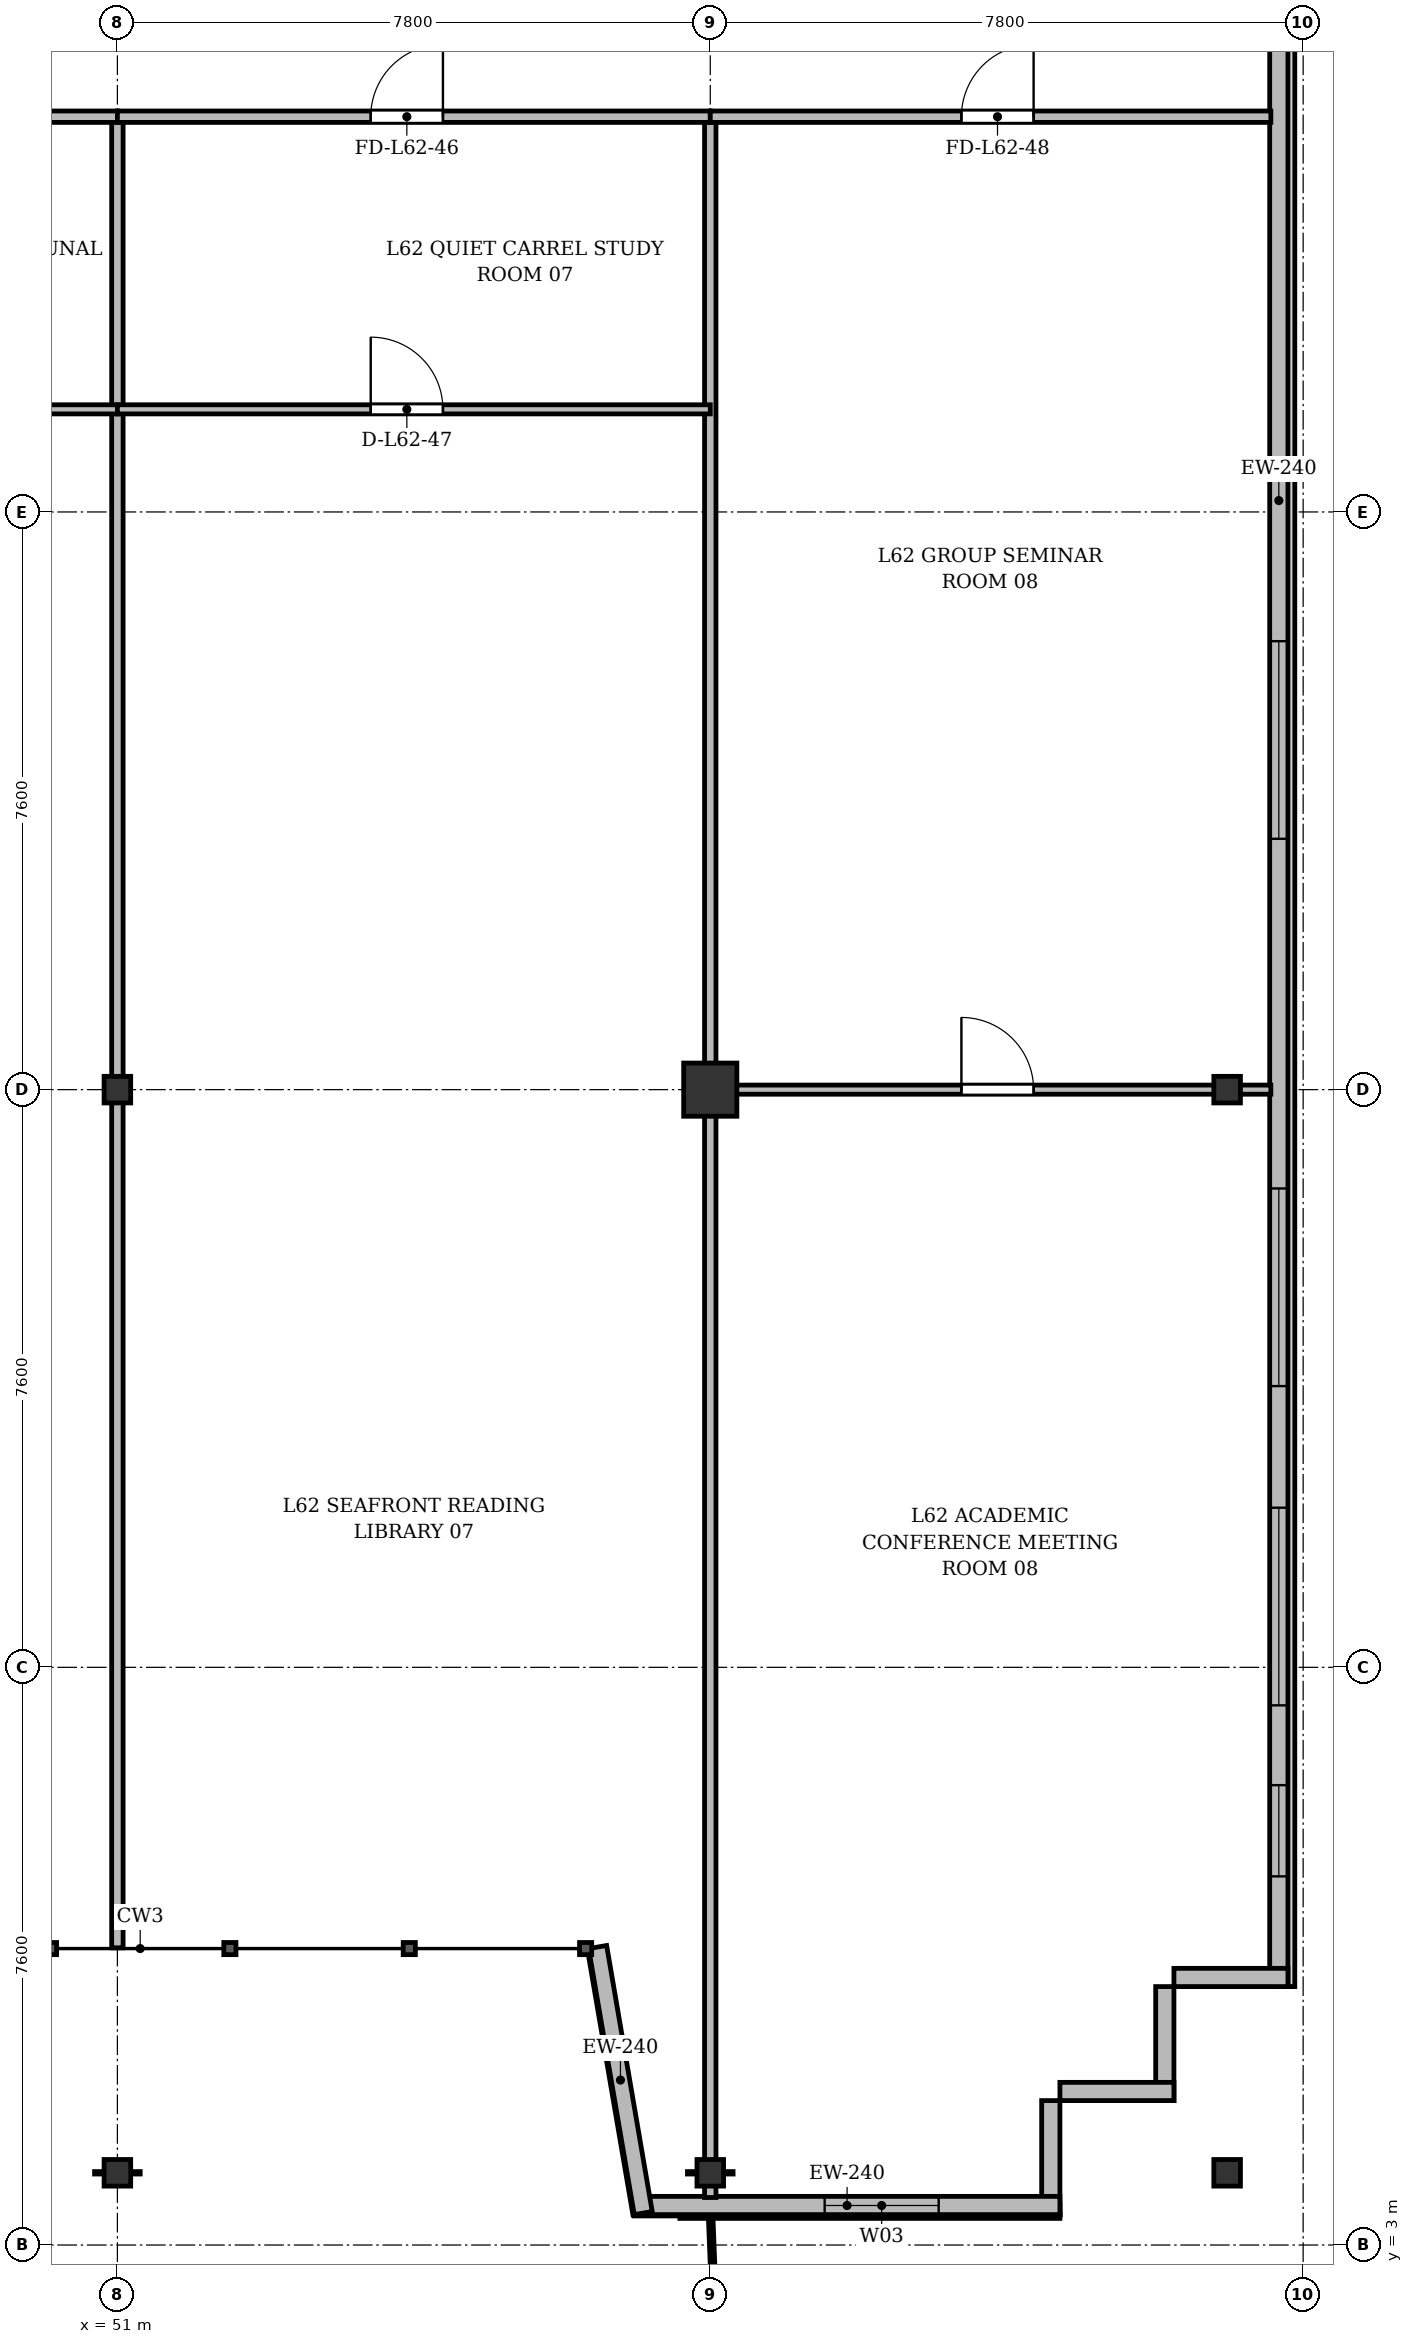
"""IFC4 building model, lengths in metres.
Left out: names, types, materials, properties, quantities, classifications, styles, units other than length and angle.
Written with IfcOpenShell. Run it as: python <this file> out.ifc"""

import sys

from ifc_helpers import new_model, si_unit, direction, frame, frame_2d, origin, origin_2d, place, context, subcontext, project, spatial, rectangle, i_section, extrude, source, transform, mapped, element, fill, save


model = new_model("IFC4")
c1 = context("Model", 3, precision=1e-05, world=origin(), true_north=direction((0.0, 1.0)))
c2 = subcontext(c1, "Body", "Model", "MODEL_VIEW")
j1 = project(units=[si_unit("LENGTHUNIT", "METRE"), si_unit("PLANEANGLEUNIT", "RADIAN")], contexts=[c1])
p1 = place(None, origin())
s1 = spatial("IfcSite", under=j1, at=p1, CompositionType="ELEMENT")
p2 = place(p1, origin())
s2 = spatial("IfcBuilding", under=s1, at=p2, CompositionType="ELEMENT")
p3 = place(p2, frame((0.0, 0.0, 237.3)))
s3 = spatial("IfcBuildingStorey", under=s2, at=p3, CompositionType="ELEMENT", Elevation=237.3)
m1 = source(origin(), c2, "Body", "SweptSolid", [
    extrude(i_section(OverallWidth=0.35, OverallDepth=0.35, WebThickness=0.018, FlangeThickness=0.028, at=origin_2d()), origin(), (0.0, 0.0, 1.0), 3.6),
])
for number, where, z_axis, x_axis in (
    (1, (51.0, 3.95, 0.0), (0.0, 0.0, 1.0), (1.0, 0.0, 0.0)),
    (2, (51.0, 18.2, 0.0), (0.0, 0.0, 1.0), (1.0, 0.0, 0.0)),
    (3, (58.8, 3.95, 0.0), (0.0, 0.0, 1.0), (1.0, 0.0, 0.0)),
):
    element("IfcColumn", number, at=place(p3, frame(where, z_axis=z_axis, x_axis=x_axis)), inside=s3, PredefinedType="COLUMN", context=c2, shape_type="MappedRepresentation", body=[
        mapped(m1, transform((0.0, 0.0, 0.0), x_axis=(1.0, 0.0, 0.0), y_axis=(0.0, 1.0, 0.0), z_axis=(0.0, 0.0, 1.0), scale=1.0)),
    ])
m2 = source(origin(), c2, "Body", "SweptSolid", [
    extrude(rectangle(XDim=0.7, YDim=0.7, at=origin_2d()), origin(), (0.0, 0.0, 1.0), 3.6),
])
p4 = place(p3, frame((58.8, 18.2, 0.0), z_axis=(0.0, 0.0, 1.0), x_axis=(1.0, 0.0, 0.0)))
e4 = element("IfcColumn", 4, at=p4, inside=s3, PredefinedType="COLUMN", context=c2, shape_type="MappedRepresentation", body=[
    mapped(m2, transform((0.0, 0.0, 0.0), x_axis=(1.0, 0.0, 0.0), y_axis=(0.0, 1.0, 0.0), z_axis=(0.0, 0.0, 1.0), scale=1.0)),
])
for number, where, z_axis, x_axis in (
    (5, (65.6, 3.95, 0.0), (0.0, 0.0, 1.0), (1.0, 0.0, 0.0)),
    (6, (65.6, 18.2, 0.0), (0.0, 0.0, 1.0), (1.0, 0.0, 0.0)),
):
    element("IfcColumn", number, at=place(p3, frame(where, z_axis=z_axis, x_axis=x_axis)), inside=s3, PredefinedType="COLUMN", context=c2, shape_type="MappedRepresentation", body=[
        mapped(m1, transform((0.0, 0.0, 0.0), x_axis=(1.0, 0.0, 0.0), y_axis=(0.0, 1.0, 0.0), z_axis=(0.0, 0.0, 1.0), scale=1.0)),
    ])
p5 = place(p3, frame((66.28, 45.5, 0.0), z_axis=(0.0, 0.0, 1.0), x_axis=(0.0, -1.0, 0.0)))
e7 = element("IfcWall", 7, at=p5, inside=s3, PredefinedType="SOLIDWALL", context=c2, shape_type="SweptSolid", body=[
    extrude(rectangle(XDim=39.1, YDim=0.24, at=frame_2d((19.55, 0.0))), origin(), (0.0, 0.0, 1.0), 3.22),
])
p6 = place(p5, frame((36.45, 0.0, 0.92)))
e8 = element("IfcOpeningElement", 8, at=p6, cuts=e7, PredefinedType="OPENING", context=c2, shape_type="SweptSolid", body=[
    extrude(rectangle(XDim=1.2, YDim=1.65, at=frame_2d((0.6, 0.825))), frame((0.0, 0.13, 0.0), z_axis=(0.0, -1.0, 0.0), x_axis=(1.0, 0.0, 0.0)), (0.0, 0.0, 1.0), 0.26),
])
p7 = place(p5, frame((32.8, 0.0, 0.92)))
e9 = element("IfcOpeningElement", 9, at=p7, cuts=e7, PredefinedType="OPENING", context=c2, shape_type="SweptSolid", body=[
    extrude(rectangle(XDim=2.6, YDim=1.9, at=frame_2d((1.3, 0.95))), frame((0.0, 0.13, 0.0), z_axis=(0.0, -1.0, 0.0), x_axis=(1.0, 0.0, 0.0)), (0.0, 0.0, 1.0), 0.26),
])
p8 = place(p5, frame((28.6, 0.0, 0.92)))
e10 = element("IfcOpeningElement", 10, at=p8, cuts=e7, PredefinedType="OPENING", context=c2, shape_type="SweptSolid", body=[
    extrude(rectangle(XDim=2.6, YDim=1.9, at=frame_2d((1.3, 0.95))), frame((0.0, 0.13, 0.0), z_axis=(0.0, -1.0, 0.0), x_axis=(1.0, 0.0, 0.0)), (0.0, 0.0, 1.0), 0.26),
])
p9 = place(p5, frame((21.4, 0.0, 0.92)))
e11 = element("IfcOpeningElement", 11, at=p9, cuts=e7, PredefinedType="OPENING", context=c2, shape_type="SweptSolid", body=[
    extrude(rectangle(XDim=2.6, YDim=1.9, at=frame_2d((1.3, 0.95))), frame((0.0, 0.13, 0.0), z_axis=(0.0, -1.0, 0.0), x_axis=(1.0, 0.0, 0.0)), (0.0, 0.0, 1.0), 0.26),
])
p10 = place(p5, frame((7.4, 0.0, 0.92)))
e12 = element("IfcOpeningElement", 12, at=p10, cuts=e7, PredefinedType="OPENING", context=c2, shape_type="SweptSolid", body=[
    extrude(rectangle(XDim=2.6, YDim=1.9, at=frame_2d((1.3, 0.95))), frame((0.0, 0.13, 0.0), z_axis=(0.0, -1.0, 0.0), x_axis=(1.0, 0.0, 0.0)), (0.0, 0.0, 1.0), 0.26),
])
p11 = place(p5, frame((4.5, 0.0, 0.92)))
e13 = element("IfcOpeningElement", 13, at=p11, cuts=e7, PredefinedType="OPENING", context=c2, shape_type="SweptSolid", body=[
    extrude(rectangle(XDim=1.2, YDim=1.65, at=frame_2d((0.6, 0.825))), frame((0.0, 0.13, 0.0), z_axis=(0.0, -1.0, 0.0), x_axis=(1.0, 0.0, 0.0)), (0.0, 0.0, 1.0), 0.26),
])
p12 = place(p5, frame((1.15, 0.0, 0.92)))
e14 = element("IfcOpeningElement", 14, at=p12, cuts=e7, PredefinedType="OPENING", context=c2, shape_type="SweptSolid", body=[
    extrude(rectangle(XDim=1.2, YDim=1.65, at=frame_2d((0.6, 0.825))), frame((0.0, 0.13, 0.0), z_axis=(0.0, -1.0, 0.0), x_axis=(1.0, 0.0, 0.0)), (0.0, 0.0, 1.0), 0.26),
])
p13 = place(p3, frame((66.4, 6.52, 0.0), z_axis=(0.0, 0.0, 1.0), x_axis=(-1.0, 0.0, 0.0)))
e15 = element("IfcWall", 15, at=p13, inside=s3, PredefinedType="SOLIDWALL", context=c2, shape_type="SweptSolid", body=[
    extrude(rectangle(XDim=1.5, YDim=0.24, at=frame_2d((0.75, 0.0))), origin(), (0.0, 0.0, 1.0), 2.72),
])
for number, where, z_axis, x_axis in (
    (16, (64.78, 6.4, 0.0), (0.0, 0.0, 1.0), (0.0, -1.0, 0.0)),
    (17, (64.9, 5.02, 0.0), (0.0, 0.0, 1.0), (-1.0, 0.0, 0.0)),
):
    element("IfcWall", number, at=place(p3, frame(where, z_axis=z_axis, x_axis=x_axis)), inside=s3, PredefinedType="SOLIDWALL", context=c2, shape_type="SweptSolid", body=[
        extrude(rectangle(XDim=1.5, YDim=0.24, at=frame_2d((0.75, 0.0))), origin(), (0.0, 0.0, 1.0), 3.22),
    ])
p14 = place(p3, frame((63.28, 4.9, 0.0), z_axis=(0.0, 0.0, 1.0), x_axis=(0.0, -1.0, 0.0)))
e18 = element("IfcWall", 18, at=p14, inside=s3, PredefinedType="SOLIDWALL", context=c2, shape_type="SweptSolid", body=[
    extrude(rectangle(XDim=1.5, YDim=0.24, at=frame_2d((0.75, 0.0))), origin(), (0.0, 0.0, 1.0), 2.77),
])
p15 = place(p3, frame((63.4, 3.52, 0.0), z_axis=(0.0, 0.0, 1.0), x_axis=(-1.0, 0.0, 0.0)))
e19 = element("IfcWall", 19, at=p15, inside=s3, PredefinedType="SOLIDWALL", context=c2, shape_type="SweptSolid", body=[
    extrude(rectangle(XDim=5.6, YDim=0.24, at=frame_2d((2.8, 0.0))), origin(), (0.0, 0.0, 1.0), 3.22),
])
p16 = place(p15, frame((1.595, 0.0, 0.9)))
e20 = element("IfcOpeningElement", 20, at=p16, cuts=e19, PredefinedType="OPENING", context=c2, shape_type="SweptSolid", body=[
    extrude(rectangle(XDim=1.5, YDim=1.75, at=frame_2d((0.75, 0.875))), frame((0.0, 0.13, 0.0), z_axis=(0.0, -1.0, 0.0), x_axis=(1.0, 0.0, 0.0)), (0.0, 0.0, 1.0), 0.26),
])
p17 = place(p3, frame((57.918, 3.42, 0.0), z_axis=(0.0, 0.0, 1.0), x_axis=(-0.168923741424, 0.98562912375, 0.0)))
e21 = element("IfcWall", 21, at=p17, inside=s3, PredefinedType="SOLIDWALL", context=c2, shape_type="SweptSolid", body=[
    extrude(rectangle(XDim=3.551, YDim=0.24, at=frame_2d((1.775, 0.0))), origin(), (0.0, 0.0, 1.0), 2.77),
])
p18 = place(p3, frame((51.0, 6.91, 0.0), z_axis=(0.0, 0.0, 1.0), x_axis=(0.0, 1.0, 0.0)))
e22 = element("IfcWall", 22, at=p18, inside=s3, PredefinedType="PARTITIONING", context=c2, shape_type="SweptSolid", body=[
    extrude(rectangle(XDim=24.09, YDim=0.15, at=frame_2d((12.045, 0.0))), origin(), (0.0, 0.0, 1.0), 2.72),
])
p19 = place(p3, frame((58.8, 3.625, 0.0), z_axis=(0.0, 0.0, 1.0), x_axis=(0.0, 1.0, 0.0)))
e23 = element("IfcWall", 23, at=p19, inside=s3, PredefinedType="PARTITIONING", context=c2, shape_type="SweptSolid", body=[
    extrude(rectangle(XDim=27.375, YDim=0.15, at=frame_2d((13.688, 0.0))), origin(), (0.0, 0.0, 1.0), 2.72),
])
p20 = place(p3, frame((43.8, 31.0, 0.0), z_axis=(0.0, 0.0, 1.0), x_axis=(1.0, 0.0, 0.0)))
e24 = element("IfcWall", 24, at=p20, inside=s3, PredefinedType="PARTITIONING", context=c2, shape_type="SweptSolid", body=[
    extrude(rectangle(XDim=7.2, YDim=0.15, at=frame_2d((3.6, 0.0))), origin(), (0.0, 0.0, 1.0), 2.72),
])
p21 = place(p20, frame((3.125, 0.0, 0.0)))
e25 = element("IfcOpeningElement", 25, at=p21, cuts=e24, PredefinedType="OPENING", context=c2, shape_type="SweptSolid", body=[
    extrude(rectangle(XDim=0.95, YDim=2.15, at=frame_2d((0.475, 1.075))), frame((0.0, 0.085, 0.0), z_axis=(0.0, -1.0, 0.0), x_axis=(1.0, 0.0, 0.0)), (0.0, 0.0, 1.0), 0.17),
])
p22 = place(p3, frame((43.8, 27.15, 0.0), z_axis=(0.0, 0.0, 1.0), x_axis=(1.0, 0.0, 0.0)))
e26 = element("IfcWall", 26, at=p22, inside=s3, PredefinedType="PARTITIONING", context=c2, shape_type="SweptSolid", body=[
    extrude(rectangle(XDim=7.2, YDim=0.12, at=frame_2d((3.6, 0.0))), origin(), (0.0, 0.0, 1.0), 2.72),
])
p23 = place(p22, frame((3.125, 0.0, 0.0)))
e27 = element("IfcOpeningElement", 27, at=p23, cuts=e26, PredefinedType="OPENING", context=c2, shape_type="SweptSolid", body=[
    extrude(rectangle(XDim=0.95, YDim=2.15, at=frame_2d((0.475, 1.075))), frame((0.0, 0.07, 0.0), z_axis=(0.0, -1.0, 0.0), x_axis=(1.0, 0.0, 0.0)), (0.0, 0.0, 1.0), 0.14),
])
p24 = place(p3, frame((51.0, 31.0, 0.0), z_axis=(0.0, 0.0, 1.0), x_axis=(1.0, 0.0, 0.0)))
e28 = element("IfcWall", 28, at=p24, inside=s3, PredefinedType="PARTITIONING", context=c2, shape_type="SweptSolid", body=[
    extrude(rectangle(XDim=7.8, YDim=0.15, at=frame_2d((3.9, 0.0))), origin(), (0.0, 0.0, 1.0), 2.72),
])
p25 = place(p24, frame((3.333, 0.0, 0.0)))
e29 = element("IfcOpeningElement", 29, at=p25, cuts=e28, PredefinedType="OPENING", context=c2, shape_type="SweptSolid", body=[
    extrude(rectangle(XDim=0.95, YDim=2.15, at=frame_2d((0.475, 1.075))), frame((0.0, 0.085, 0.0), z_axis=(0.0, -1.0, 0.0), x_axis=(1.0, 0.0, 0.0)), (0.0, 0.0, 1.0), 0.17),
])
p26 = place(p3, frame((51.0, 27.15, 0.0), z_axis=(0.0, 0.0, 1.0), x_axis=(1.0, 0.0, 0.0)))
e30 = element("IfcWall", 30, at=p26, inside=s3, PredefinedType="PARTITIONING", context=c2, shape_type="SweptSolid", body=[
    extrude(rectangle(XDim=7.8, YDim=0.12, at=frame_2d((3.9, 0.0))), origin(), (0.0, 0.0, 1.0), 2.72),
])
p27 = place(p26, frame((3.333, 0.0, 0.0)))
e31 = element("IfcOpeningElement", 31, at=p27, cuts=e30, PredefinedType="OPENING", context=c2, shape_type="SweptSolid", body=[
    extrude(rectangle(XDim=0.95, YDim=2.15, at=frame_2d((0.475, 1.075))), frame((0.0, 0.07, 0.0), z_axis=(0.0, -1.0, 0.0), x_axis=(1.0, 0.0, 0.0)), (0.0, 0.0, 1.0), 0.14),
])
p28 = place(p3, frame((58.8, 31.0, 0.0), z_axis=(0.0, 0.0, 1.0), x_axis=(1.0, 0.0, 0.0)))
e32 = element("IfcWall", 32, at=p28, inside=s3, PredefinedType="PARTITIONING", context=c2, shape_type="SweptSolid", body=[
    extrude(rectangle(XDim=7.375, YDim=0.15, at=frame_2d((3.688, 0.0))), origin(), (0.0, 0.0, 1.0), 2.72),
])
p29 = place(p28, frame((3.304, 0.0, 0.0)))
e33 = element("IfcOpeningElement", 33, at=p29, cuts=e32, PredefinedType="OPENING", context=c2, shape_type="SweptSolid", body=[
    extrude(rectangle(XDim=0.95, YDim=2.15, at=frame_2d((0.475, 1.075))), frame((0.0, 0.085, 0.0), z_axis=(0.0, -1.0, 0.0), x_axis=(1.0, 0.0, 0.0)), (0.0, 0.0, 1.0), 0.17),
])
p30 = place(p3, frame((58.8, 18.2, 0.0), z_axis=(0.0, 0.0, 1.0), x_axis=(1.0, 0.0, 0.0)))
e34 = element("IfcWall", 34, at=p30, inside=s3, PredefinedType="PARTITIONING", context=c2, shape_type="SweptSolid", body=[
    extrude(rectangle(XDim=7.375, YDim=0.12, at=frame_2d((3.688, 0.0))), origin(), (0.0, 0.0, 1.0), 2.77),
])
p31 = place(p30, frame((3.304, 0.0, 0.0)))
e35 = element("IfcOpeningElement", 35, at=p31, cuts=e34, PredefinedType="OPENING", context=c2, shape_type="SweptSolid", body=[
    extrude(rectangle(XDim=0.95, YDim=2.15, at=frame_2d((0.475, 1.075))), frame((0.0, 0.07, 0.0), z_axis=(0.0, -1.0, 0.0), x_axis=(1.0, 0.0, 0.0)), (0.0, 0.0, 1.0), 0.14),
])
m3 = source(origin(), c2, "Body", "SweptSolid", [
    extrude(rectangle(XDim=1.2, YDim=1.65, at=frame_2d((0.6, 0.825))), frame((0.0, 0.03, 0.0), z_axis=(0.0, -1.0, 0.0), x_axis=(1.0, 0.0, 0.0)), (0.0, 0.0, 1.0), 0.06),
])
p32 = place(p6, origin())
e36 = element("IfcWindow", 36, at=p32, inside=s3, PartitioningType="SINGLE_PANEL", PredefinedType="WINDOW", context=c2, shape_type="MappedRepresentation", body=[
    mapped(m3, transform((0.0, 0.0, 0.0), x_axis=(1.0, 0.0, 0.0), y_axis=(0.0, 1.0, 0.0), z_axis=(0.0, 0.0, 1.0), scale=1.0)),
])
fill(e8, e36)
m4 = source(origin(), c2, "Body", "SweptSolid", [
    extrude(rectangle(XDim=2.6, YDim=1.9, at=frame_2d((1.3, 0.95))), frame((0.0, 0.03, 0.0), z_axis=(0.0, -1.0, 0.0), x_axis=(1.0, 0.0, 0.0)), (0.0, 0.0, 1.0), 0.06),
])
p33 = place(p7, origin())
e37 = element("IfcWindow", 37, at=p33, inside=s3, PartitioningType="SINGLE_PANEL", PredefinedType="WINDOW", context=c2, shape_type="MappedRepresentation", body=[
    mapped(m4, transform((0.0, 0.0, 0.0), x_axis=(1.0, 0.0, 0.0), y_axis=(0.0, 1.0, 0.0), z_axis=(0.0, 0.0, 1.0), scale=1.0)),
])
fill(e9, e37)
p34 = place(p8, origin())
e38 = element("IfcWindow", 38, at=p34, inside=s3, PartitioningType="SINGLE_PANEL", PredefinedType="WINDOW", context=c2, shape_type="MappedRepresentation", body=[
    mapped(m4, transform((0.0, 0.0, 0.0), x_axis=(1.0, 0.0, 0.0), y_axis=(0.0, 1.0, 0.0), z_axis=(0.0, 0.0, 1.0), scale=1.0)),
])
fill(e10, e38)
p35 = place(p9, origin())
e39 = element("IfcWindow", 39, at=p35, inside=s3, PartitioningType="SINGLE_PANEL", PredefinedType="WINDOW", context=c2, shape_type="MappedRepresentation", body=[
    mapped(m4, transform((0.0, 0.0, 0.0), x_axis=(1.0, 0.0, 0.0), y_axis=(0.0, 1.0, 0.0), z_axis=(0.0, 0.0, 1.0), scale=1.0)),
])
fill(e11, e39)
m5 = source(origin(), c2, "Body", "SweptSolid", [
    extrude(rectangle(XDim=1.5, YDim=1.75, at=frame_2d((0.75, 0.875))), frame((0.0, 0.03, 0.0), z_axis=(0.0, -1.0, 0.0), x_axis=(1.0, 0.0, 0.0)), (0.0, 0.0, 1.0), 0.06),
])
p36 = place(p16, origin())
e40 = element("IfcWindow", 40, at=p36, inside=s3, PartitioningType="SINGLE_PANEL", PredefinedType="WINDOW", context=c2, shape_type="MappedRepresentation", body=[
    mapped(m5, transform((0.0, 0.0, 0.0), x_axis=(1.0, 0.0, 0.0), y_axis=(0.0, 1.0, 0.0), z_axis=(0.0, 0.0, 1.0), scale=1.0)),
])
fill(e20, e40)
m6 = source(origin(), c2, "Body", "SweptSolid", [
    extrude(rectangle(XDim=0.95, YDim=2.15, at=frame_2d((0.475, 1.075))), frame((0.0, 0.025, 0.0), z_axis=(0.0, -1.0, 0.0), x_axis=(1.0, 0.0, 0.0)), (0.0, 0.0, 1.0), 0.05),
])
p37 = place(p25, origin())
e41 = element("IfcDoor", 41, at=p37, inside=s3, OperationType="SINGLE_SWING_RIGHT", PredefinedType="DOOR", context=c2, shape_type="MappedRepresentation", body=[
    mapped(m6, transform((0.0, 0.0, 0.0), x_axis=(1.0, 0.0, 0.0), y_axis=(0.0, 1.0, 0.0), z_axis=(0.0, 0.0, 1.0), scale=1.0)),
])
fill(e29, e41)
p38 = place(p27, origin())
e42 = element("IfcDoor", 42, at=p38, inside=s3, OperationType="SINGLE_SWING_LEFT", PredefinedType="DOOR", context=c2, shape_type="MappedRepresentation", body=[
    mapped(m6, transform((0.0, 0.0, 0.0), x_axis=(1.0, 0.0, 0.0), y_axis=(0.0, 1.0, 0.0), z_axis=(0.0, 0.0, 1.0), scale=1.0)),
])
fill(e31, e42)
p39 = place(p29, origin())
e43 = element("IfcDoor", 43, at=p39, inside=s3, OperationType="SINGLE_SWING_RIGHT", PredefinedType="DOOR", context=c2, shape_type="MappedRepresentation", body=[
    mapped(m6, transform((0.0, 0.0, 0.0), x_axis=(1.0, 0.0, 0.0), y_axis=(0.0, 1.0, 0.0), z_axis=(0.0, 0.0, 1.0), scale=1.0)),
])
fill(e33, e43)
p40 = place(p31, origin())
e44 = element("IfcDoor", 44, at=p40, inside=s3, OperationType="SINGLE_SWING_LEFT", PredefinedType="DOOR", context=c2, shape_type="MappedRepresentation", body=[
    mapped(m6, transform((0.0, 0.0, 0.0), x_axis=(1.0, 0.0, 0.0), y_axis=(0.0, 1.0, 0.0), z_axis=(0.0, 0.0, 1.0), scale=1.0)),
])
fill(e35, e44)
save(model, sys.argv[1])
